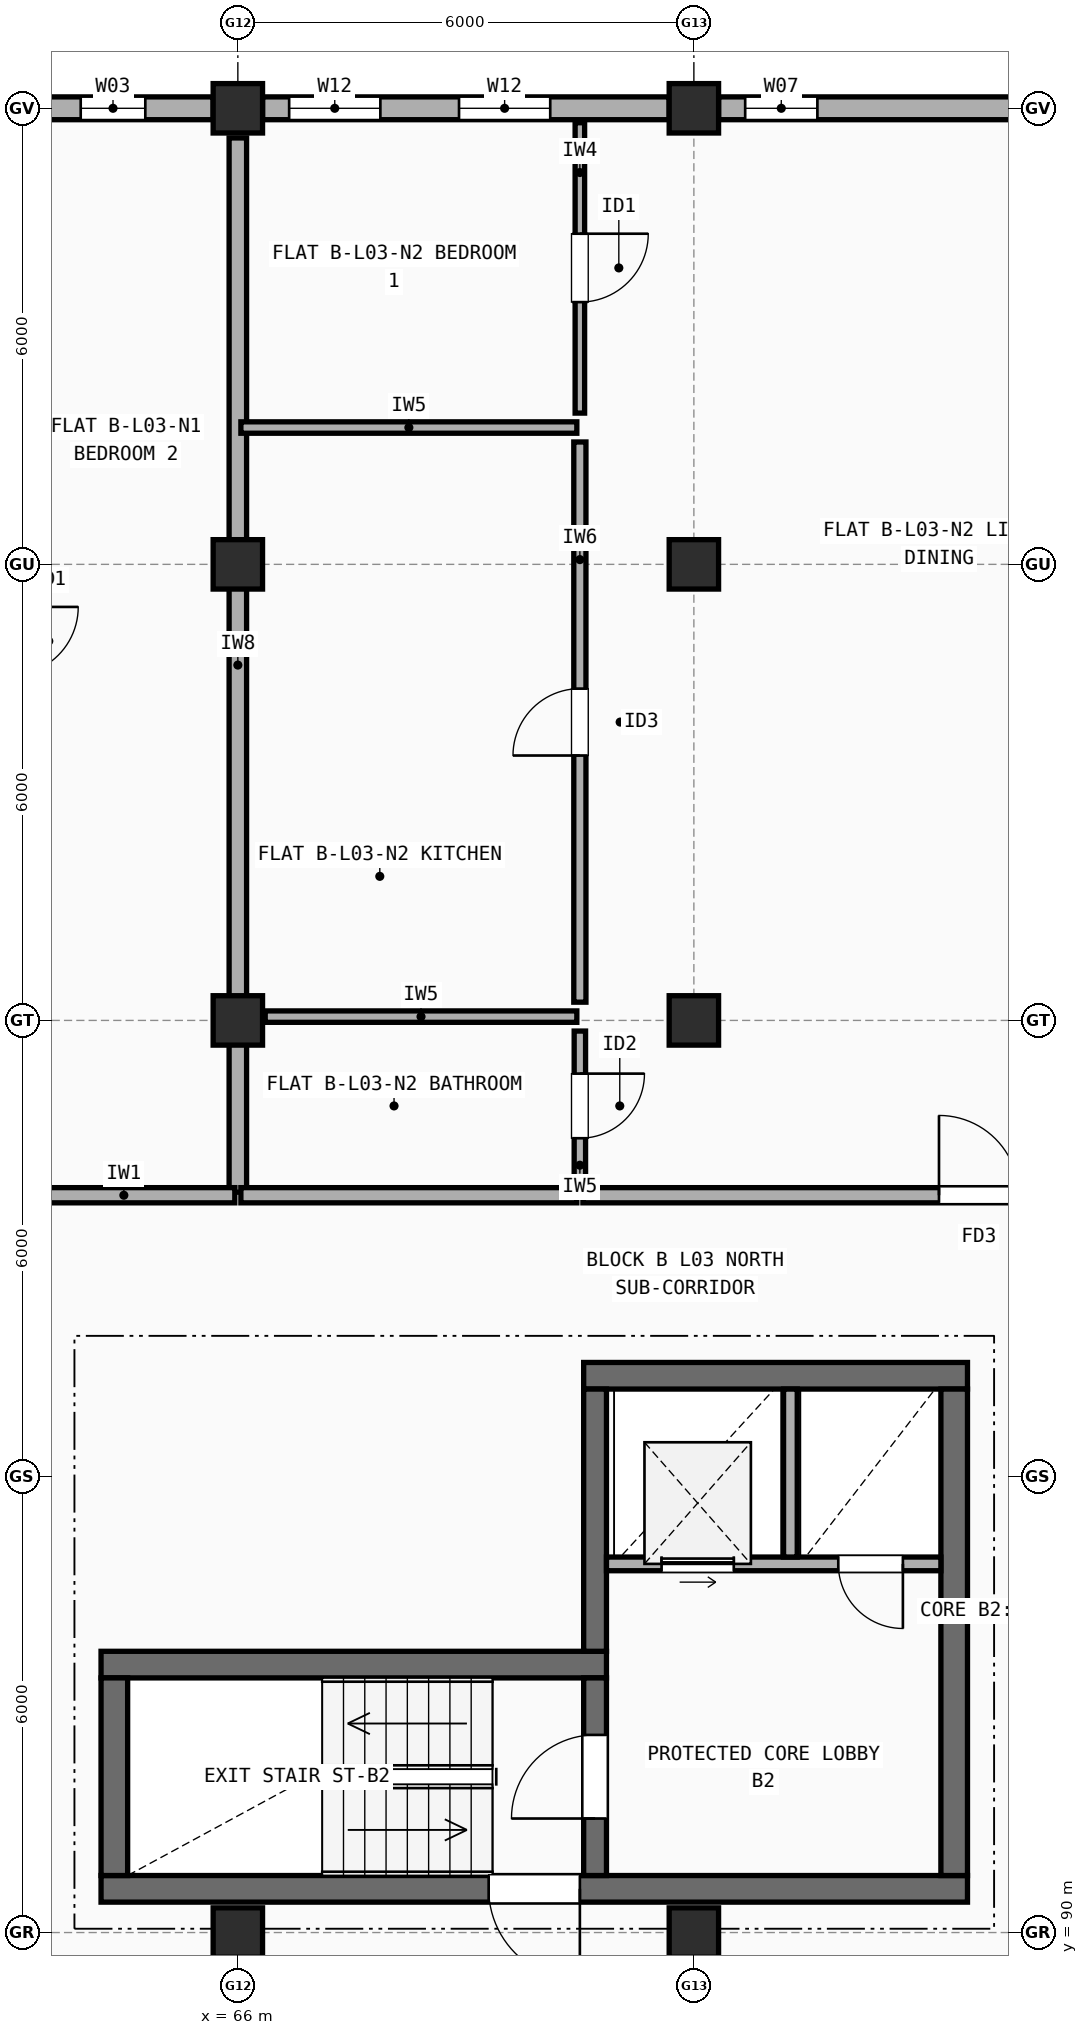
"""IFC4 building model, lengths in metres.
Left out: names, types, materials, properties, quantities, classifications, styles, units other than length and angle.
Written with IfcOpenShell. Run it as: python <this file> out.ifc"""

import sys

from ifc_helpers import new_model, si_unit, direction, frame, frame_2d, origin, origin_2d, place, context, subcontext, project, spatial, rectangle, extrude, element, fill, save


model = new_model("IFC4")
c1 = context("Model", 3, precision=1e-05, world=origin(), true_north=direction((0.0, 1.0)))
c2 = subcontext(c1, "Body", "Model", "MODEL_VIEW")
j1 = project(units=[si_unit("LENGTHUNIT", "METRE"), si_unit("PLANEANGLEUNIT", "RADIAN")], contexts=[c1])
p1 = place(None, origin())
s1 = spatial("IfcSite", under=j1, at=p1, CompositionType="ELEMENT")
p2 = place(p1, origin())
s2 = spatial("IfcBuilding", under=s1, at=p2, CompositionType="ELEMENT")
p3 = place(p2, frame((0.0, 0.0, 10.9)))
s3 = spatial("IfcBuildingStorey", under=s2, at=p3, CompositionType="ELEMENT", Elevation=10.9)
for number, where, z_axis, x_axis in (
    (1, (66.0, 90.0, 0.0), (0.0, 0.0, 1.0), (1.0, 0.0, 0.0)),
    (2, (66.0, 102.0, 0.0), (0.0, 0.0, 1.0), (1.0, 0.0, 0.0)),
    (3, (66.0, 108.0, 0.0), (0.0, 0.0, 1.0), (1.0, 0.0, 0.0)),
    (4, (66.0, 114.0, 0.0), (0.0, 0.0, 1.0), (1.0, 0.0, 0.0)),
    (5, (72.0, 90.0, 0.0), (0.0, 0.0, 1.0), (1.0, 0.0, 0.0)),
    (6, (72.0, 102.0, 0.0), (0.0, 0.0, 1.0), (1.0, 0.0, 0.0)),
    (7, (72.0, 108.0, 0.0), (0.0, 0.0, 1.0), (1.0, 0.0, 0.0)),
    (8, (72.0, 114.0, 0.0), (0.0, 0.0, 1.0), (1.0, 0.0, 0.0)),
):
    element("IfcColumn", number, at=place(p3, frame(where, z_axis=z_axis, x_axis=x_axis)), inside=s3, PredefinedType="COLUMN", context=c2, shape_type="SweptSolid", body=[
        extrude(rectangle(XDim=0.65, YDim=0.65, at=origin_2d()), origin(), (0.0, 0.0, 1.0), 2.96),
    ])
p4 = place(p3, frame((77.725, 114.0, 0.0), z_axis=(0.0, 0.0, 1.0), x_axis=(-1.0, 0.0, 0.0)))
e9 = element("IfcWall", 9, at=p4, inside=s3, PredefinedType="STANDARD", context=c2, shape_type="SweptSolid", body=[
    extrude(rectangle(XDim=5.4, YDim=0.3, at=frame_2d((2.7, 0.0))), origin(), (0.0, 0.0, 1.0), 2.442),
])
p5 = place(p4, frame((0.35, 0.0, 0.9)))
e10 = element("IfcOpeningElement", 10, at=p5, cuts=e9, PredefinedType="OPENING", context=c2, shape_type="SweptSolid", body=[
    extrude(rectangle(XDim=0.95, YDim=1.35, at=frame_2d((0.475, 0.675))), frame((0.0, 0.16, 0.0), z_axis=(0.0, -1.0, 0.0), x_axis=(1.0, 0.0, 0.0)), (0.0, 0.0, 1.0), 0.32),
])
p6 = place(p4, frame((4.1, 0.0, 0.9)))
e11 = element("IfcOpeningElement", 11, at=p6, cuts=e9, PredefinedType="OPENING", context=c2, shape_type="SweptSolid", body=[
    extrude(rectangle(XDim=0.95, YDim=1.35, at=frame_2d((0.475, 0.675))), frame((0.0, 0.16, 0.0), z_axis=(0.0, -1.0, 0.0), x_axis=(1.0, 0.0, 0.0)), (0.0, 0.0, 1.0), 0.32),
])
p7 = place(p3, frame((71.675, 114.0, 0.0), z_axis=(0.0, 0.0, 1.0), x_axis=(-1.0, 0.0, 0.0)))
e12 = element("IfcWall", 12, at=p7, inside=s3, PredefinedType="STANDARD", context=c2, shape_type="SweptSolid", body=[
    extrude(rectangle(XDim=5.35, YDim=0.3, at=frame_2d((2.675, 0.0))), origin(), (0.0, 0.0, 1.0), 2.442),
])
p8 = place(p7, frame((1.565, 0.0, 0.9)))
e13 = element("IfcOpeningElement", 13, at=p8, cuts=e12, PredefinedType="OPENING", context=c2, shape_type="SweptSolid", body=[
    extrude(rectangle(XDim=1.2, YDim=1.35, at=frame_2d((0.6, 0.675))), frame((0.0, 0.16, 0.0), z_axis=(0.0, -1.0, 0.0), x_axis=(1.0, 0.0, 0.0)), (0.0, 0.0, 1.0), 0.32),
])
p9 = place(p7, frame((3.8, 0.0, 0.9)))
e14 = element("IfcOpeningElement", 14, at=p9, cuts=e12, PredefinedType="OPENING", context=c2, shape_type="SweptSolid", body=[
    extrude(rectangle(XDim=1.2, YDim=1.35, at=frame_2d((0.6, 0.675))), frame((0.0, 0.16, 0.0), z_axis=(0.0, -1.0, 0.0), x_axis=(1.0, 0.0, 0.0)), (0.0, 0.0, 1.0), 0.32),
])
p10 = place(p3, frame((65.675, 114.0, 0.0), z_axis=(0.0, 0.0, 1.0), x_axis=(-1.0, 0.0, 0.0)))
e15 = element("IfcWall", 15, at=p10, inside=s3, PredefinedType="STANDARD", context=c2, shape_type="SweptSolid", body=[
    extrude(rectangle(XDim=5.35, YDim=0.3, at=frame_2d((2.675, 0.0))), origin(), (0.0, 0.0, 1.0), 2.442),
])
p11 = place(p10, frame((0.893, 0.0, 0.9)))
e16 = element("IfcOpeningElement", 16, at=p11, cuts=e15, PredefinedType="OPENING", context=c2, shape_type="SweptSolid", body=[
    extrude(rectangle(XDim=0.85, YDim=1.25, at=frame_2d((0.425, 0.625))), frame((0.0, 0.16, 0.0), z_axis=(0.0, -1.0, 0.0), x_axis=(1.0, 0.0, 0.0)), (0.0, 0.0, 1.0), 0.32),
])
p12 = place(p10, frame((3.583, 0.0, 0.9)))
e17 = element("IfcOpeningElement", 17, at=p12, cuts=e15, PredefinedType="OPENING", context=c2, shape_type="SweptSolid", body=[
    extrude(rectangle(XDim=0.9, YDim=1.3, at=frame_2d((0.45, 0.65))), frame((0.0, 0.16, 0.0), z_axis=(0.0, -1.0, 0.0), x_axis=(1.0, 0.0, 0.0)), (0.0, 0.0, 1.0), 0.32),
])
p13 = place(p3, frame((64.2, 90.575, 0.0), z_axis=(0.0, 0.0, 1.0), x_axis=(1.0, 0.0, 0.0)))
e18 = element("IfcWall", 18, at=p13, inside=s3, PredefinedType="SHEAR", context=c2, shape_type="SweptSolid", body=[
    extrude(rectangle(XDim=11.4, YDim=0.35, at=frame_2d((5.7, 0.0))), origin(), (0.0, 0.0, 1.0), 2.96),
])
p14 = place(p13, frame((5.1, 0.0, 0.0)))
e19 = element("IfcOpeningElement", 19, at=p14, cuts=e18, PredefinedType="OPENING", context=c2, shape_type="SweptSolid", body=[
    extrude(rectangle(XDim=1.2, YDim=2.15, at=frame_2d((0.6, 1.075))), frame((0.0, 0.185, 0.0), z_axis=(0.0, -1.0, 0.0), x_axis=(1.0, 0.0, 0.0)), (0.0, 0.0, 1.0), 0.37),
])
p15 = place(p3, frame((70.85, 93.525, 0.0), z_axis=(0.0, 0.0, 1.0), x_axis=(-1.0, 0.0, 0.0)))
e20 = element("IfcWall", 20, at=p15, inside=s3, PredefinedType="SHEAR", context=c2, shape_type="SweptSolid", body=[
    extrude(rectangle(XDim=6.65, YDim=0.35, at=frame_2d((3.325, 0.0))), origin(), (0.0, 0.0, 1.0), 2.96),
])
p16 = place(p3, frame((64.375, 93.35, 0.0), z_axis=(0.0, 0.0, 1.0), x_axis=(0.0, -1.0, 0.0)))
e21 = element("IfcWall", 21, at=p16, inside=s3, PredefinedType="SHEAR", context=c2, shape_type="SweptSolid", body=[
    extrude(rectangle(XDim=2.6, YDim=0.35, at=frame_2d((1.3, 0.0))), origin(), (0.0, 0.0, 1.0), 2.96),
])
p17 = place(p3, frame((70.7, 90.75, 0.0), z_axis=(0.0, 0.0, 1.0), x_axis=(0.0, 1.0, 0.0)))
e22 = element("IfcWall", 22, at=p17, inside=s3, PredefinedType="SHEAR", context=c2, shape_type="SweptSolid", body=[
    extrude(rectangle(XDim=2.6, YDim=0.3, at=frame_2d((1.3, 0.0))), origin(), (0.0, 0.0, 1.0), 2.96),
])
p18 = place(p17, frame((0.75, 0.0, 0.0)))
e23 = element("IfcOpeningElement", 23, at=p18, cuts=e22, PredefinedType="OPENING", context=c2, shape_type="SweptSolid", body=[
    extrude(rectangle(XDim=1.1, YDim=2.15, at=frame_2d((0.55, 1.075))), frame((0.0, 0.16, 0.0), z_axis=(0.0, -1.0, 0.0), x_axis=(1.0, 0.0, 0.0)), (0.0, 0.0, 1.0), 0.32),
])
p19 = place(p3, frame((75.6, 97.325, 0.0), z_axis=(0.0, 0.0, 1.0), x_axis=(-1.0, 0.0, 0.0)))
e24 = element("IfcWall", 24, at=p19, inside=s3, PredefinedType="SHEAR", context=c2, shape_type="SweptSolid", body=[
    extrude(rectangle(XDim=5.05, YDim=0.35, at=frame_2d((2.525, 0.0))), origin(), (0.0, 0.0, 1.0), 2.96),
])
p20 = place(p3, frame((75.425, 90.75, 0.0), z_axis=(0.0, 0.0, 1.0), x_axis=(0.0, 1.0, 0.0)))
e25 = element("IfcWall", 25, at=p20, inside=s3, PredefinedType="SHEAR", context=c2, shape_type="SweptSolid", body=[
    extrude(rectangle(XDim=6.4, YDim=0.35, at=frame_2d((3.2, 0.0))), origin(), (0.0, 0.0, 1.0), 2.96),
])
p21 = place(p3, frame((70.7, 93.7, 0.0), z_axis=(0.0, 0.0, 1.0), x_axis=(0.0, 1.0, 0.0)))
e26 = element("IfcWall", 26, at=p21, inside=s3, PredefinedType="SHEAR", context=c2, shape_type="SweptSolid", body=[
    extrude(rectangle(XDim=3.45, YDim=0.3, at=frame_2d((1.725, 0.0))), origin(), (0.0, 0.0, 1.0), 2.96),
])
p22 = place(p3, frame((70.85, 94.85, 0.0), z_axis=(0.0, 0.0, 1.0), x_axis=(1.0, 0.0, 0.0)))
e27 = element("IfcWall", 27, at=p22, inside=s3, PredefinedType="SOLIDWALL", context=c2, shape_type="SweptSolid", body=[
    extrude(rectangle(XDim=4.4, YDim=0.18, at=frame_2d((2.2, 0.0))), origin(), (0.0, 0.0, 1.0), 2.96),
])
p23 = place(p22, frame((0.725, 0.0, 0.0)))
e28 = element("IfcOpeningElement", 28, at=p23, cuts=e27, PredefinedType="OPENING", context=c2, shape_type="SweptSolid", body=[
    extrude(rectangle(XDim=0.95, YDim=2.15, at=frame_2d((0.475, 1.075))), frame((0.0, 0.1, 0.0), z_axis=(0.0, -1.0, 0.0), x_axis=(1.0, 0.0, 0.0)), (0.0, 0.0, 1.0), 0.2),
])
p24 = place(p22, frame((3.05, 0.0, 0.0)))
e29 = element("IfcOpeningElement", 29, at=p24, cuts=e27, PredefinedType="OPENING", context=c2, shape_type="SweptSolid", body=[
    extrude(rectangle(XDim=0.85, YDim=2.1, at=frame_2d((0.425, 1.05))), frame((0.0, 0.1, 0.0), z_axis=(0.0, -1.0, 0.0), x_axis=(1.0, 0.0, 0.0)), (0.0, 0.0, 1.0), 0.2),
])
p25 = place(p3, frame((73.27, 94.94, 0.0), z_axis=(0.0, 0.0, 1.0), x_axis=(0.0, 1.0, 0.0)))
e30 = element("IfcWall", 30, at=p25, inside=s3, PredefinedType="SOLIDWALL", context=c2, shape_type="SweptSolid", body=[
    extrude(rectangle(XDim=2.21, YDim=0.18, at=frame_2d((1.105, 0.0))), origin(), (0.0, 0.0, 1.0), 2.96),
])
p26 = place(p3, frame((66.0, 99.74, 0.0), z_axis=(0.0, 0.0, 1.0), x_axis=(0.0, 1.0, 0.0)))
e31 = element("IfcWall", 31, at=p26, inside=s3, PredefinedType="SOLIDWALL", context=c2, shape_type="SweptSolid", body=[
    extrude(rectangle(XDim=13.87, YDim=0.23, at=frame_2d((6.935, 0.0))), origin(), (0.0, 0.0, 1.0), 2.458),
])
p27 = place(p3, frame((63.04, 99.7, 0.0), z_axis=(0.0, 0.0, 1.0), x_axis=(1.0, 0.0, 0.0)))
e32 = element("IfcWall", 32, at=p27, inside=s3, PredefinedType="SOLIDWALL", context=c2, shape_type="SweptSolid", body=[
    extrude(rectangle(XDim=2.92, YDim=0.2, at=frame_2d((1.46, 0.0))), origin(), (0.0, 0.0, 1.0), 2.96),
])
p28 = place(p3, frame((66.04, 99.7, 0.0), z_axis=(0.0, 0.0, 1.0), x_axis=(1.0, 0.0, 0.0)))
e33 = element("IfcWall", 33, at=p28, inside=s3, PredefinedType="SOLIDWALL", context=c2, shape_type="SweptSolid", body=[
    extrude(rectangle(XDim=4.42, YDim=0.2, at=frame_2d((2.21, 0.0))), origin(), (0.0, 0.0, 1.0), 2.96),
])
p29 = place(p3, frame((70.54, 99.7, 0.0), z_axis=(0.0, 0.0, 1.0), x_axis=(1.0, 0.0, 0.0)))
e34 = element("IfcWall", 34, at=p29, inside=s3, PredefinedType="SOLIDWALL", context=c2, shape_type="SweptSolid", body=[
    extrude(rectangle(XDim=10.42, YDim=0.2, at=frame_2d((5.21, 0.0))), origin(), (0.0, 0.0, 1.0), 2.442),
])
p30 = place(p29, frame((4.685, 0.0, 0.0)))
e35 = element("IfcOpeningElement", 35, at=p30, cuts=e34, PredefinedType="OPENING", context=c2, shape_type="SweptSolid", body=[
    extrude(rectangle(XDim=1.05, YDim=2.15, at=frame_2d((0.525, 1.075))), frame((0.0, 0.11, 0.0), z_axis=(0.0, -1.0, 0.0), x_axis=(1.0, 0.0, 0.0)), (0.0, 0.0, 1.0), 0.22),
])
p31 = place(p3, frame((70.5, 109.99, 0.0), z_axis=(0.0, 0.0, 1.0), x_axis=(0.0, 1.0, 0.0)))
e36 = element("IfcWall", 36, at=p31, inside=s3, PredefinedType="PARTITIONING", context=c2, shape_type="SweptSolid", body=[
    extrude(rectangle(XDim=3.82, YDim=0.125, at=frame_2d((1.91, 0.0))), origin(), (0.0, 0.0, 1.0), 2.96),
])
p32 = place(p31, frame((1.46, 0.0, 0.0)))
e37 = element("IfcOpeningElement", 37, at=p32, cuts=e36, PredefinedType="OPENING", context=c2, shape_type="SweptSolid", body=[
    extrude(rectangle(XDim=0.9, YDim=2.1, at=frame_2d((0.45, 1.05))), frame((0.0, 0.073, 0.0), z_axis=(0.0, -1.0, 0.0), x_axis=(1.0, 0.0, 0.0)), (0.0, 0.0, 1.0), 0.145),
])
p33 = place(p3, frame((70.5, 102.24, 0.0), z_axis=(0.0, 0.0, 1.0), x_axis=(0.0, 1.0, 0.0)))
e38 = element("IfcWall", 38, at=p33, inside=s3, PredefinedType="PLUMBINGWALL", context=c2, shape_type="SweptSolid", body=[
    extrude(rectangle(XDim=7.37, YDim=0.16, at=frame_2d((3.685, 0.0))), origin(), (0.0, 0.0, 1.0), 2.442),
])
p34 = place(p33, frame((3.245, 0.0, 0.0)))
e39 = element("IfcOpeningElement", 39, at=p34, cuts=e38, PredefinedType="OPENING", context=c2, shape_type="SweptSolid", body=[
    extrude(rectangle(XDim=0.88, YDim=2.1, at=frame_2d((0.44, 1.05))), frame((0.0, 0.09, 0.0), z_axis=(0.0, -1.0, 0.0), x_axis=(1.0, 0.0, 0.0)), (0.0, 0.0, 1.0), 0.18),
])
p35 = place(p3, frame((70.5, 99.89, 0.0), z_axis=(0.0, 0.0, 1.0), x_axis=(0.0, 1.0, 0.0)))
e40 = element("IfcWall", 40, at=p35, inside=s3, PredefinedType="PARTITIONING", context=c2, shape_type="SweptSolid", body=[
    extrude(rectangle(XDim=1.97, YDim=0.15, at=frame_2d((0.985, 0.0))), origin(), (0.0, 0.0, 1.0), 2.96),
])
p36 = place(p35, frame((0.56, 0.0, 0.0)))
e41 = element("IfcOpeningElement", 41, at=p36, cuts=e40, PredefinedType="OPENING", context=c2, shape_type="SweptSolid", body=[
    extrude(rectangle(XDim=0.85, YDim=2.1, at=frame_2d((0.425, 1.05))), frame((0.0, 0.085, 0.0), z_axis=(0.0, -1.0, 0.0), x_axis=(1.0, 0.0, 0.0)), (0.0, 0.0, 1.0), 0.17),
])
p37 = place(p3, frame((66.04, 109.8, 0.0), z_axis=(0.0, 0.0, 1.0), x_axis=(1.0, 0.0, 0.0)))
e42 = element("IfcWall", 42, at=p37, inside=s3, PredefinedType="PARTITIONING", context=c2, shape_type="SweptSolid", body=[
    extrude(rectangle(XDim=4.42, YDim=0.15, at=frame_2d((2.21, 0.0))), origin(), (0.0, 0.0, 1.0), 2.458),
])
p38 = place(p3, frame((66.36, 102.05, 0.0), z_axis=(0.0, 0.0, 1.0), x_axis=(1.0, 0.0, 0.0)))
e43 = element("IfcWall", 43, at=p38, inside=s3, PredefinedType="PARTITIONING", context=c2, shape_type="SweptSolid", body=[
    extrude(rectangle(XDim=4.1, YDim=0.15, at=frame_2d((2.05, 0.0))), origin(), (0.0, 0.0, 1.0), 2.442),
])
p39 = place(p6, origin())
e44 = element("IfcWindow", 44, at=p39, inside=s3, PartitioningType="SINGLE_PANEL", PredefinedType="WINDOW", context=c2, shape_type="SweptSolid", body=[
    extrude(rectangle(XDim=0.95, YDim=1.35, at=frame_2d((0.475, 0.675))), frame((0.0, 0.03, 0.0), z_axis=(0.0, -1.0, 0.0), x_axis=(1.0, 0.0, 0.0)), (0.0, 0.0, 1.0), 0.06),
])
fill(e11, e44)
p40 = place(p8, origin())
e45 = element("IfcWindow", 45, at=p40, inside=s3, PartitioningType="SINGLE_PANEL", PredefinedType="WINDOW", context=c2, shape_type="SweptSolid", body=[
    extrude(rectangle(XDim=1.2, YDim=1.35, at=frame_2d((0.6, 0.675))), frame((0.0, 0.03, 0.0), z_axis=(0.0, -1.0, 0.0), x_axis=(1.0, 0.0, 0.0)), (0.0, 0.0, 1.0), 0.06),
])
fill(e13, e45)
p41 = place(p9, origin())
e46 = element("IfcWindow", 46, at=p41, inside=s3, PartitioningType="SINGLE_PANEL", PredefinedType="WINDOW", context=c2, shape_type="SweptSolid", body=[
    extrude(rectangle(XDim=1.2, YDim=1.35, at=frame_2d((0.6, 0.675))), frame((0.0, 0.03, 0.0), z_axis=(0.0, -1.0, 0.0), x_axis=(1.0, 0.0, 0.0)), (0.0, 0.0, 1.0), 0.06),
])
fill(e14, e46)
p42 = place(p11, origin())
e47 = element("IfcWindow", 47, at=p42, inside=s3, PartitioningType="SINGLE_PANEL", PredefinedType="WINDOW", context=c2, shape_type="SweptSolid", body=[
    extrude(rectangle(XDim=0.85, YDim=1.25, at=frame_2d((0.425, 0.625))), frame((0.0, 0.03, 0.0), z_axis=(0.0, -1.0, 0.0), x_axis=(1.0, 0.0, 0.0)), (0.0, 0.0, 1.0), 0.06),
])
fill(e16, e47)
p43 = place(p14, origin())
e48 = element("IfcDoor", 48, at=p43, inside=s3, OperationType="SINGLE_SWING_RIGHT", PredefinedType="DOOR", context=c2, shape_type="SweptSolid", body=[
    extrude(rectangle(XDim=1.2, YDim=2.15, at=frame_2d((0.6, 1.075))), frame((0.0, 0.025, 0.0), z_axis=(0.0, -1.0, 0.0), x_axis=(1.0, 0.0, 0.0)), (0.0, 0.0, 1.0), 0.05),
])
fill(e19, e48)
p44 = place(p18, origin())
e49 = element("IfcDoor", 49, at=p44, inside=s3, OperationType="SINGLE_SWING_LEFT", PredefinedType="DOOR", context=c2, shape_type="SweptSolid", body=[
    extrude(rectangle(XDim=1.1, YDim=2.15, at=frame_2d((0.55, 1.075))), frame((0.0, 0.025, 0.0), z_axis=(0.0, -1.0, 0.0), x_axis=(1.0, 0.0, 0.0)), (0.0, 0.0, 1.0), 0.05),
])
fill(e23, e49)
p45 = place(p23, origin())
e50 = element("IfcDoor", 50, at=p45, inside=s3, OperationType="SLIDING_TO_LEFT", PredefinedType="DOOR", context=c2, shape_type="SweptSolid", body=[
    extrude(rectangle(XDim=0.95, YDim=2.15, at=frame_2d((0.475, 1.075))), frame((0.0, 0.025, 0.0), z_axis=(0.0, -1.0, 0.0), x_axis=(1.0, 0.0, 0.0)), (0.0, 0.0, 1.0), 0.05),
])
fill(e28, e50)
p46 = place(p24, frame((0.85, 0.0, 0.0), z_axis=(0.0, 0.0, 1.0), x_axis=(-1.0, 0.0, 0.0)))
e51 = element("IfcDoor", 51, at=p46, inside=s3, OperationType="SINGLE_SWING_RIGHT", PredefinedType="DOOR", context=c2, shape_type="SweptSolid", body=[
    extrude(rectangle(XDim=0.85, YDim=2.1, at=frame_2d((0.425, 1.05))), frame((0.0, 0.025, 0.0), z_axis=(0.0, -1.0, 0.0), x_axis=(1.0, 0.0, 0.0)), (0.0, 0.0, 1.0), 0.05),
])
fill(e29, e51)
p47 = place(p30, origin())
e52 = element("IfcDoor", 52, at=p47, inside=s3, OperationType="SINGLE_SWING_LEFT", PredefinedType="DOOR", context=c2, shape_type="SweptSolid", body=[
    extrude(rectangle(XDim=1.05, YDim=2.15, at=frame_2d((0.525, 1.075))), frame((0.0, 0.025, 0.0), z_axis=(0.0, -1.0, 0.0), x_axis=(1.0, 0.0, 0.0)), (0.0, 0.0, 1.0), 0.05),
])
fill(e35, e52)
p48 = place(p32, origin())
e53 = element("IfcDoor", 53, at=p48, inside=s3, OperationType="SINGLE_SWING_RIGHT", PredefinedType="DOOR", context=c2, shape_type="SweptSolid", body=[
    extrude(rectangle(XDim=0.9, YDim=2.1, at=frame_2d((0.45, 1.05))), frame((0.0, 0.025, 0.0), z_axis=(0.0, -1.0, 0.0), x_axis=(1.0, 0.0, 0.0)), (0.0, 0.0, 1.0), 0.05),
])
fill(e37, e53)
p49 = place(p34, origin())
e54 = element("IfcDoor", 54, at=p49, inside=s3, OperationType="SINGLE_SWING_LEFT", PredefinedType="DOOR", context=c2, shape_type="SweptSolid", body=[
    extrude(rectangle(XDim=0.88, YDim=2.1, at=frame_2d((0.44, 1.05))), frame((0.0, 0.025, 0.0), z_axis=(0.0, -1.0, 0.0), x_axis=(1.0, 0.0, 0.0)), (0.0, 0.0, 1.0), 0.05),
])
fill(e39, e54)
p50 = place(p36, origin())
e55 = element("IfcDoor", 55, at=p50, inside=s3, OperationType="SINGLE_SWING_RIGHT", PredefinedType="DOOR", context=c2, shape_type="SweptSolid", body=[
    extrude(rectangle(XDim=0.85, YDim=2.1, at=frame_2d((0.425, 1.05))), frame((0.0, 0.025, 0.0), z_axis=(0.0, -1.0, 0.0), x_axis=(1.0, 0.0, 0.0)), (0.0, 0.0, 1.0), 0.05),
])
fill(e41, e55)
save(model, sys.argv[1])
